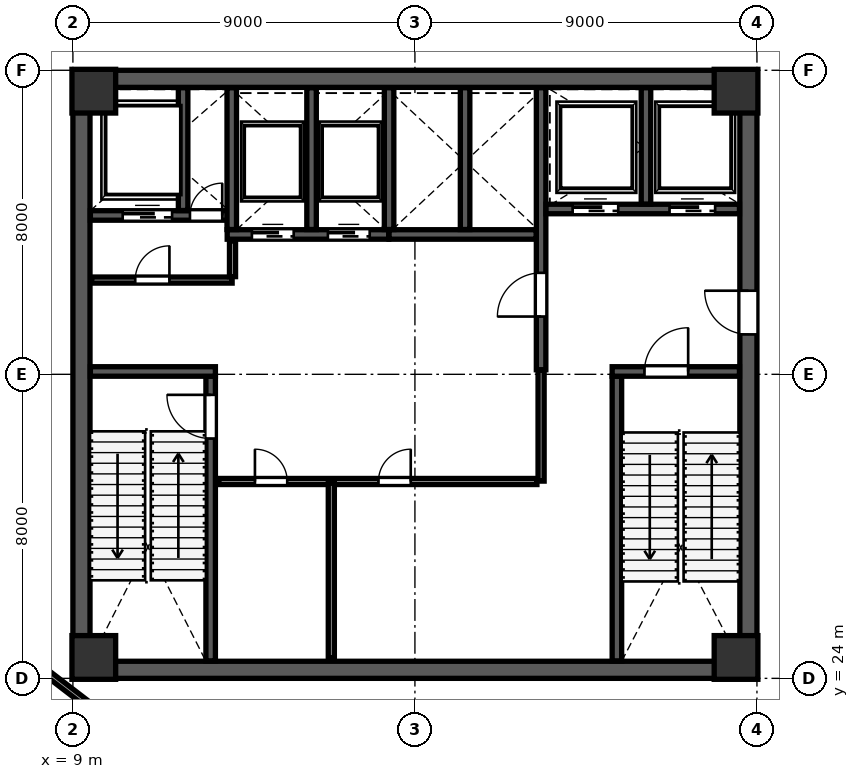
"""IFC4 building model, lengths in metres.
Left out: names, types, materials, properties, quantities, classifications, styles, units other than length and angle.
Written with IfcOpenShell. Run it as: python <this file> out.ifc"""

import sys

from ifc_helpers import new_model, si_unit, direction, frame, frame_2d, origin, origin_2d, place, context, subcontext, project, spatial, rectangle, extrude, source, transform, mapped, element, fill, save


model = new_model("IFC4")
c1 = context("Model", 3, precision=1e-05, world=origin(), true_north=direction((0.0, 1.0)))
c2 = subcontext(c1, "Body", "Model", "MODEL_VIEW")
j1 = project(units=[si_unit("LENGTHUNIT", "METRE"), si_unit("PLANEANGLEUNIT", "RADIAN")], contexts=[c1])
p1 = place(None, origin())
s1 = spatial("IfcSite", under=j1, at=p1, CompositionType="ELEMENT")
p2 = place(p1, origin())
s2 = spatial("IfcBuilding", under=s1, at=p2, CompositionType="ELEMENT")
p3 = place(p2, frame((0.0, 0.0, 204.4)))
s3 = spatial("IfcBuildingStorey", under=s2, at=p3, CompositionType="ELEMENT", Elevation=204.4)
m1 = source(origin(), c2, "Body", "SweptSolid", [
    extrude(rectangle(XDim=1.15, YDim=1.15, at=origin_2d()), origin(), (0.0, 0.0, 1.0), 5.399),
])
for number, where, z_axis, x_axis in (
    (1, (9.55, 24.55, 0.001), (0.0, 0.0, 1.0), (1.0, 0.0, 0.0)),
    (2, (26.45, 24.55, 0.001), (0.0, 0.0, 1.0), (1.0, 0.0, 0.0)),
    (3, (9.55, 39.45, 0.001), (0.0, 0.0, 1.0), (1.0, 0.0, 0.0)),
    (4, (26.45, 39.45, 0.001), (0.0, 0.0, 1.0), (1.0, 0.0, 0.0)),
):
    element("IfcColumn", number, at=place(p3, frame(where, z_axis=z_axis, x_axis=x_axis)), inside=s3, PredefinedType="COLUMN", context=c2, shape_type="MappedRepresentation", body=[
        mapped(m1, transform((0.0, 0.0, 0.0), scale=1.0)),
    ])
p4 = place(p3, frame((9.225, 24.45, 0.0), z_axis=(0.0, 0.0, 1.0), x_axis=(0.0, 1.0, 0.0)))
e5 = element("IfcWall", 5, at=p4, inside=s3, PredefinedType="SHEAR", context=c2, shape_type="SweptSolid", body=[
    extrude(rectangle(XDim=15.1, YDim=0.45, at=frame_2d((7.55, 0.0))), origin(), (0.0, 0.0, 1.0), 5.12),
])
p5 = place(p3, frame((26.775, 24.45, 0.0), z_axis=(0.0, 0.0, 1.0), x_axis=(0.0, 1.0, 0.0)))
e6 = element("IfcWall", 6, at=p5, inside=s3, PredefinedType="SHEAR", context=c2, shape_type="SweptSolid", body=[
    extrude(rectangle(XDim=15.1, YDim=0.45, at=frame_2d((7.55, 0.0))), origin(), (0.0, 0.0, 1.0), 5.12),
])
p6 = place(p5, frame((8.6, 0.0, 0.0)))
e7 = element("IfcOpeningElement", 7, at=p6, cuts=e6, PredefinedType="OPENING", context=c2, shape_type="SweptSolid", body=[
    extrude(rectangle(XDim=1.15, YDim=2.2, at=frame_2d((0.575, 1.1))), frame((0.0, 0.235, 0.0), z_axis=(0.0, -1.0, 0.0), x_axis=(1.0, 0.0, 0.0)), (0.0, 0.0, 1.0), 0.47),
])
for number, where, z_axis, x_axis in (
    (8, (9.0, 24.225, 0.0), (0.0, 0.0, 1.0), (1.0, 0.0, 0.0)),
    (9, (9.0, 39.775, 0.0), (0.0, 0.0, 1.0), (1.0, 0.0, 0.0)),
):
    element("IfcWall", number, at=place(p3, frame(where, z_axis=z_axis, x_axis=x_axis)), inside=s3, PredefinedType="SHEAR", context=c2, shape_type="SweptSolid", body=[
        extrude(rectangle(XDim=18.0, YDim=0.45, at=frame_2d((9.0, 0.0))), origin(), (0.0, 0.0, 1.0), 5.12),
    ])
p7 = place(p3, frame((12.625, 24.46, 0.0), z_axis=(0.0, 0.0, 1.0), x_axis=(0.0, 1.0, 0.0)))
e10 = element("IfcWall", 10, at=p7, inside=s3, PredefinedType="SHEAR", context=c2, shape_type="SweptSolid", body=[
    extrude(rectangle(XDim=7.49, YDim=0.25, at=frame_2d((3.745, 0.0))), origin(), (0.0, 0.0, 1.0), 5.12),
])
p8 = place(p7, frame((5.85, 0.0, 0.0)))
e11 = element("IfcOpeningElement", 11, at=p8, cuts=e10, PredefinedType="OPENING", context=c2, shape_type="SweptSolid", body=[
    extrude(rectangle(XDim=1.15, YDim=2.2, at=frame_2d((0.575, 1.1))), frame((0.0, 0.135, 0.0), z_axis=(0.0, -1.0, 0.0), x_axis=(1.0, 0.0, 0.0)), (0.0, 0.0, 1.0), 0.27),
])
p9 = place(p3, frame((9.46, 32.075, 0.0), z_axis=(0.0, 0.0, 1.0), x_axis=(1.0, 0.0, 0.0)))
e12 = element("IfcWall", 12, at=p9, inside=s3, PredefinedType="SHEAR", context=c2, shape_type="SweptSolid", body=[
    extrude(rectangle(XDim=3.29, YDim=0.25, at=frame_2d((1.645, 0.0))), origin(), (0.0, 0.0, 1.0), 5.12),
])
p10 = place(p3, frame((23.315, 24.46, 0.0), z_axis=(0.0, 0.0, 1.0), x_axis=(0.0, 1.0, 0.0)))
e13 = element("IfcWall", 13, at=p10, inside=s3, PredefinedType="SHEAR", context=c2, shape_type="SweptSolid", body=[
    extrude(rectangle(XDim=7.49, YDim=0.25, at=frame_2d((3.745, 0.0))), origin(), (0.0, 0.0, 1.0), 5.12),
])
p11 = place(p3, frame((23.19, 32.075, 0.0), z_axis=(0.0, 0.0, 1.0), x_axis=(1.0, 0.0, 0.0)))
e14 = element("IfcWall", 14, at=p11, inside=s3, PredefinedType="SHEAR", context=c2, shape_type="SweptSolid", body=[
    extrude(rectangle(XDim=3.35, YDim=0.25, at=frame_2d((1.675, 0.0))), origin(), (0.0, 0.0, 1.0), 5.12),
])
p12 = place(p11, frame((0.85, 0.0, 0.0)))
e15 = element("IfcOpeningElement", 15, at=p12, cuts=e14, PredefinedType="OPENING", context=c2, shape_type="SweptSolid", body=[
    extrude(rectangle(XDim=1.15, YDim=2.2, at=frame_2d((0.575, 1.1))), frame((0.0, 0.135, 0.0), z_axis=(0.0, -1.0, 0.0), x_axis=(1.0, 0.0, 0.0)), (0.0, 0.0, 1.0), 0.27),
])
p13 = place(p3, frame((21.32, 32.12, 0.0), z_axis=(0.0, 0.0, 1.0), x_axis=(0.0, 1.0, 0.0)))
e16 = element("IfcWall", 16, at=p13, inside=s3, PredefinedType="SHEAR", context=c2, shape_type="SweptSolid", body=[
    extrude(rectangle(XDim=7.42, YDim=0.25, at=frame_2d((3.71, 0.0))), origin(), (0.0, 0.0, 1.0), 5.12),
])
p14 = place(p13, frame((1.4, 0.0, 0.0)))
e17 = element("IfcOpeningElement", 17, at=p14, cuts=e16, PredefinedType="OPENING", context=c2, shape_type="SweptSolid", body=[
    extrude(rectangle(XDim=1.15, YDim=2.2, at=frame_2d((0.575, 1.1))), frame((0.0, 0.135, 0.0), z_axis=(0.0, -1.0, 0.0), x_axis=(1.0, 0.0, 0.0)), (0.0, 0.0, 1.0), 0.27),
])
p15 = place(p3, frame((9.46, 36.18, 0.0), z_axis=(0.0, 0.0, 1.0), x_axis=(1.0, 0.0, 0.0)))
e18 = element("IfcWall", 18, at=p15, inside=s3, PredefinedType="SHEAR", context=c2, shape_type="SweptSolid", body=[
    extrude(rectangle(XDim=3.79, YDim=0.25, at=frame_2d((1.895, 0.0))), origin(), (0.0, 0.0, 1.0), 5.12),
])
p16 = place(p15, frame((2.62, 0.0, 0.0)))
e19 = element("IfcOpeningElement", 19, at=p16, cuts=e18, PredefinedType="OPENING", context=c2, shape_type="SweptSolid", body=[
    extrude(rectangle(XDim=0.85, YDim=2.1, at=frame_2d((0.425, 1.05))), frame((0.0, 0.135, 0.0), z_axis=(0.0, -1.0, 0.0), x_axis=(1.0, 0.0, 0.0)), (0.0, 0.0, 1.0), 0.27),
])
p17 = place(p15, frame((0.85, 0.0, 0.0)))
e20 = element("IfcOpeningElement", 20, at=p17, cuts=e18, PredefinedType="OPENING", context=c2, shape_type="SweptSolid", body=[
    extrude(rectangle(XDim=1.3, YDim=2.25, at=frame_2d((0.65, 1.125))), frame((0.0, 0.135, 0.0), z_axis=(0.0, -1.0, 0.0), x_axis=(1.0, 0.0, 0.0)), (0.0, 0.0, 1.0), 0.27),
])
p18 = place(p3, frame((11.9, 36.31, 0.0), z_axis=(0.0, 0.0, 1.0), x_axis=(0.0, 1.0, 0.0)))
e21 = element("IfcWall", 21, at=p18, inside=s3, PredefinedType="SHEAR", context=c2, shape_type="SweptSolid", body=[
    extrude(rectangle(XDim=3.23, YDim=0.25, at=frame_2d((1.615, 0.0))), origin(), (0.0, 0.0, 1.0), 5.12),
])
p19 = place(p3, frame((21.45, 36.35, 0.0), z_axis=(0.0, 0.0, 1.0), x_axis=(1.0, 0.0, 0.0)))
e22 = element("IfcWall", 22, at=p19, inside=s3, PredefinedType="SHEAR", context=c2, shape_type="SweptSolid", body=[
    extrude(rectangle(XDim=5.09, YDim=0.25, at=frame_2d((2.545, 0.0))), origin(), (0.0, 0.0, 1.0), 5.12),
])
p20 = place(p19, frame((0.7, 0.0, 0.0)))
e23 = element("IfcOpeningElement", 23, at=p20, cuts=e22, PredefinedType="OPENING", context=c2, shape_type="SweptSolid", body=[
    extrude(rectangle(XDim=1.2, YDim=2.2, at=frame_2d((0.6, 1.1))), frame((0.0, 0.135, 0.0), z_axis=(0.0, -1.0, 0.0), x_axis=(1.0, 0.0, 0.0)), (0.0, 0.0, 1.0), 0.27),
])
p21 = place(p19, frame((3.25, 0.0, 0.0)))
e24 = element("IfcOpeningElement", 24, at=p21, cuts=e22, PredefinedType="OPENING", context=c2, shape_type="SweptSolid", body=[
    extrude(rectangle(XDim=1.2, YDim=2.2, at=frame_2d((0.6, 1.1))), frame((0.0, 0.135, 0.0), z_axis=(0.0, -1.0, 0.0), x_axis=(1.0, 0.0, 0.0)), (0.0, 0.0, 1.0), 0.27),
])
p22 = place(p3, frame((24.08, 36.48, 0.0), z_axis=(0.0, 0.0, 1.0), x_axis=(0.0, 1.0, 0.0)))
e25 = element("IfcWall", 25, at=p22, inside=s3, PredefinedType="SHEAR", context=c2, shape_type="SweptSolid", body=[
    extrude(rectangle(XDim=3.06, YDim=0.25, at=frame_2d((1.53, 0.0))), origin(), (0.0, 0.0, 1.0), 5.12),
])
p23 = place(p3, frame((13.06, 35.68, 0.0), z_axis=(0.0, 0.0, 1.0), x_axis=(1.0, 0.0, 0.0)))
e26 = element("IfcWall", 26, at=p23, inside=s3, PredefinedType="SHEAR", context=c2, shape_type="SweptSolid", body=[
    extrude(rectangle(XDim=4.25, YDim=0.25, at=frame_2d((2.125, 0.0))), origin(), (0.0, 0.0, 1.0), 5.12),
])
p24 = place(p23, frame((0.65, 0.0, 0.0)))
e27 = element("IfcOpeningElement", 27, at=p24, cuts=e26, PredefinedType="OPENING", context=c2, shape_type="SweptSolid", body=[
    extrude(rectangle(XDim=1.1, YDim=2.2, at=frame_2d((0.55, 1.1))), frame((0.0, 0.135, 0.0), z_axis=(0.0, -1.0, 0.0), x_axis=(1.0, 0.0, 0.0)), (0.0, 0.0, 1.0), 0.27),
])
p25 = place(p23, frame((2.65, 0.0, 0.0)))
e28 = element("IfcOpeningElement", 28, at=p25, cuts=e26, PredefinedType="OPENING", context=c2, shape_type="SweptSolid", body=[
    extrude(rectangle(XDim=1.1, YDim=2.2, at=frame_2d((0.55, 1.1))), frame((0.0, 0.135, 0.0), z_axis=(0.0, -1.0, 0.0), x_axis=(1.0, 0.0, 0.0)), (0.0, 0.0, 1.0), 0.27),
])
for number, where, z_axis, x_axis in (
    (29, (13.18, 35.81, 0.0), (0.0, 0.0, 1.0), (0.0, 1.0, 0.0)),
    (30, (15.28, 35.81, 0.0), (0.0, 0.0, 1.0), (0.0, 1.0, 0.0)),
):
    element("IfcWall", number, at=place(p3, frame(where, z_axis=z_axis, x_axis=x_axis)), inside=s3, PredefinedType="SHEAR", context=c2, shape_type="SweptSolid", body=[
        extrude(rectangle(XDim=3.73, YDim=0.25, at=frame_2d((1.865, 0.0))), origin(), (0.0, 0.0, 1.0), 5.12),
    ])
p26 = place(p3, frame((17.32, 35.68, 0.0), z_axis=(0.0, 0.0, 1.0), x_axis=(1.0, 0.0, 0.0)))
e31 = element("IfcWall", 31, at=p26, inside=s3, PredefinedType="SHEAR", context=c2, shape_type="SweptSolid", body=[
    extrude(rectangle(XDim=3.87, YDim=0.25, at=frame_2d((1.935, 0.0))), origin(), (0.0, 0.0, 1.0), 5.12),
])
for number, where, z_axis, x_axis in (
    (32, (17.32, 35.81, 0.0), (0.0, 0.0, 1.0), (0.0, 1.0, 0.0)),
    (33, (19.32, 35.81, 0.0), (0.0, 0.0, 1.0), (0.0, 1.0, 0.0)),
):
    element("IfcWall", number, at=place(p3, frame(where, z_axis=z_axis, x_axis=x_axis)), inside=s3, PredefinedType="SHEAR", context=c2, shape_type="SweptSolid", body=[
        extrude(rectangle(XDim=3.73, YDim=0.25, at=frame_2d((1.865, 0.0))), origin(), (0.0, 0.0, 1.0), 5.12),
    ])
p27 = place(p3, frame((9.49, 34.48, 0.0), z_axis=(0.0, 0.0, 1.0), x_axis=(1.0, 0.0, 0.0)))
e34 = element("IfcWall", 34, at=p27, inside=s3, PredefinedType="PARTITIONING", context=c2, shape_type="SweptSolid", body=[
    extrude(rectangle(XDim=3.7, YDim=0.16, at=frame_2d((1.85, 0.0))), origin(), (0.0, 0.0, 1.0), 5.12),
])
p28 = place(p27, frame((1.15, 0.0, 0.0)))
e35 = element("IfcOpeningElement", 35, at=p28, cuts=e34, PredefinedType="OPENING", context=c2, shape_type="SweptSolid", body=[
    extrude(rectangle(XDim=0.9, YDim=2.15, at=frame_2d((0.45, 1.075))), frame((0.0, 0.09, 0.0), z_axis=(0.0, -1.0, 0.0), x_axis=(1.0, 0.0, 0.0)), (0.0, 0.0, 1.0), 0.18),
])
p29 = place(p3, frame((13.2, 34.57, 0.0), z_axis=(0.0, 0.0, 1.0), x_axis=(0.0, 1.0, 0.0)))
e36 = element("IfcWall", 36, at=p29, inside=s3, PredefinedType="PARTITIONING", context=c2, shape_type="SweptSolid", body=[
    extrude(rectangle(XDim=0.94, YDim=0.16, at=frame_2d((0.47, 0.0))), origin(), (0.0, 0.0, 1.0), 5.12),
])
p30 = place(p3, frame((12.84, 29.18, 0.0), z_axis=(0.0, 0.0, 1.0), x_axis=(1.0, 0.0, 0.0)))
e37 = element("IfcWall", 37, at=p30, inside=s3, PredefinedType="PARTITIONING", context=c2, shape_type="SweptSolid", body=[
    extrude(rectangle(XDim=8.37, YDim=0.16, at=frame_2d((4.185, 0.0))), origin(), (0.0, 0.0, 1.0), 5.12),
])
p31 = place(p30, frame((0.95, 0.0, 0.0)))
e38 = element("IfcOpeningElement", 38, at=p31, cuts=e37, PredefinedType="OPENING", context=c2, shape_type="SweptSolid", body=[
    extrude(rectangle(XDim=0.85, YDim=2.1, at=frame_2d((0.425, 1.05))), frame((0.0, 0.09, 0.0), z_axis=(0.0, -1.0, 0.0), x_axis=(1.0, 0.0, 0.0)), (0.0, 0.0, 1.0), 0.18),
])
p32 = place(p30, frame((4.2, 0.0, 0.0)))
e39 = element("IfcOpeningElement", 39, at=p32, cuts=e37, PredefinedType="OPENING", context=c2, shape_type="SweptSolid", body=[
    extrude(rectangle(XDim=0.85, YDim=2.1, at=frame_2d((0.425, 1.05))), frame((0.0, 0.09, 0.0), z_axis=(0.0, -1.0, 0.0), x_axis=(1.0, 0.0, 0.0)), (0.0, 0.0, 1.0), 0.18),
])
p33 = place(p3, frame((15.8, 24.54, 0.0), z_axis=(0.0, 0.0, 1.0), x_axis=(0.0, 1.0, 0.0)))
e40 = element("IfcWall", 40, at=p33, inside=s3, PredefinedType="PARTITIONING", context=c2, shape_type="SweptSolid", body=[
    extrude(rectangle(XDim=4.6, YDim=0.16, at=frame_2d((2.3, 0.0))), origin(), (0.0, 0.0, 1.0), 5.12),
])
p34 = place(p3, frame((21.32, 29.19, 0.0), z_axis=(0.0, 0.0, 1.0), x_axis=(0.0, 1.0, 0.0)))
e41 = element("IfcWall", 41, at=p34, inside=s3, PredefinedType="PARTITIONING", context=c2, shape_type="SweptSolid", body=[
    extrude(rectangle(XDim=2.92, YDim=0.16, at=frame_2d((1.46, 0.0))), origin(), (0.0, 0.0, 1.0), 5.12),
])
p35 = place(p3, frame((5.433, 26.354, 0.0), z_axis=(0.0, 0.0, 1.0), x_axis=(0.793362099466, -0.60875001366, 0.0)))
e42 = element("IfcWall", 42, at=p35, inside=s3, PredefinedType="PARTITIONING", context=c2, shape_type="SweptSolid", body=[
    extrude(rectangle(XDim=20.42, YDim=0.16, at=frame_2d((10.21, 0.0))), origin(), (0.0, 0.0, 1.0), 5.12),
])
p36 = place(p35, frame((1.45, 0.0, 0.0)))
e43 = element("IfcOpeningElement", 43, at=p36, cuts=e42, PredefinedType="OPENING", context=c2, shape_type="SweptSolid", body=[
    extrude(rectangle(XDim=0.95, YDim=2.15, at=frame_2d((0.475, 1.075))), frame((0.0, 0.09, 0.0), z_axis=(0.0, -1.0, 0.0), x_axis=(1.0, 0.0, 0.0)), (0.0, 0.0, 1.0), 0.18),
])
p37 = place(p3, frame((14.418, 51.551, 0.0), z_axis=(0.0, 0.0, 1.0), x_axis=(0.793357597302, -0.608755881124, 0.0)))
e44 = element("IfcWall", 44, at=p37, inside=s3, PredefinedType="PARTITIONING", context=c2, shape_type="SweptSolid", body=[
    extrude(rectangle(XDim=28.63, YDim=0.1, at=frame_2d((14.315, 0.0))), origin(), (0.0, 0.0, 1.0), 5.12),
])
p38 = place(p37, frame((20.31, 0.0, 0.0)))
e45 = element("IfcOpeningElement", 45, at=p38, cuts=e44, PredefinedType="OPENING", context=c2, shape_type="SweptSolid", body=[
    extrude(rectangle(XDim=0.95, YDim=2.15, at=frame_2d((0.475, 1.075))), frame((0.0, 0.06, 0.0), z_axis=(0.0, -1.0, 0.0), x_axis=(1.0, 0.0, 0.0)), (0.0, 0.0, 1.0), 0.12),
])
p39 = place(p3, frame((19.564, 11.16, 0.0), z_axis=(0.0, 0.0, 1.0), x_axis=(0.608754410964, 0.793358725377, 0.0)))
e46 = element("IfcWall", 46, at=p39, inside=s3, PredefinedType="PARTITIONING", context=c2, shape_type="SweptSolid", body=[
    extrude(rectangle(XDim=19.872, YDim=0.16, at=frame_2d((9.936, 0.0))), origin(), (0.0, 0.0, 1.0), 5.12),
])
m2 = source(origin(), c2, "Body", "SweptSolid", [
    extrude(rectangle(XDim=1.15, YDim=2.2, at=frame_2d((0.575, 1.1))), frame((0.0, 0.025, 0.0), z_axis=(0.0, -1.0, 0.0), x_axis=(1.0, 0.0, 0.0)), (0.0, 0.0, 1.0), 0.05),
])
p40 = place(p8, origin())
e47 = element("IfcDoor", 47, at=p40, inside=s3, OperationType="SINGLE_SWING_RIGHT", PredefinedType="DOOR", context=c2, shape_type="MappedRepresentation", body=[
    mapped(m2, transform((0.0, 0.0, 0.0), scale=1.0)),
])
fill(e11, e47)
m3 = source(origin(), c2, "Body", "SweptSolid", [
    extrude(rectangle(XDim=1.15, YDim=2.2, at=frame_2d((0.575, 1.1))), frame((0.0, 0.025, 0.0), z_axis=(0.0, -1.0, 0.0), x_axis=(1.0, 0.0, 0.0)), (0.0, 0.0, 1.0), 0.05),
])
p41 = place(p14, origin())
e48 = element("IfcDoor", 48, at=p41, inside=s3, OperationType="SINGLE_SWING_LEFT", PredefinedType="DOOR", context=c2, shape_type="MappedRepresentation", body=[
    mapped(m3, transform((0.0, 0.0, 0.0), scale=1.0)),
])
fill(e17, e48)
p42 = place(p12, origin())
e49 = element("IfcDoor", 49, at=p42, inside=s3, OperationType="SINGLE_SWING_RIGHT", PredefinedType="DOOR", context=c2, shape_type="MappedRepresentation", body=[
    mapped(m2, transform((0.0, 0.0, 0.0), scale=1.0)),
])
fill(e15, e49)
p43 = place(p6, origin())
e50 = element("IfcDoor", 50, at=p43, inside=s3, OperationType="SINGLE_SWING_RIGHT", PredefinedType="DOOR", context=c2, shape_type="MappedRepresentation", body=[
    mapped(m3, transform((0.0, 0.0, 0.0), scale=1.0)),
])
fill(e7, e50)
m4 = source(origin(), c2, "Body", "SweptSolid", [
    extrude(rectangle(XDim=0.85, YDim=2.1, at=frame_2d((0.425, 1.05))), frame((0.0, 0.025, 0.0), z_axis=(0.0, -1.0, 0.0), x_axis=(1.0, 0.0, 0.0)), (0.0, 0.0, 1.0), 0.05),
])
p44 = place(p16, origin())
e51 = element("IfcDoor", 51, at=p44, inside=s3, OperationType="SINGLE_SWING_RIGHT", PredefinedType="DOOR", context=c2, shape_type="MappedRepresentation", body=[
    mapped(m4, transform((0.0, 0.0, 0.0), scale=1.0)),
])
fill(e19, e51)
m5 = source(origin(), c2, "Body", "SweptSolid", [
    extrude(rectangle(XDim=1.1, YDim=2.2, at=frame_2d((0.55, 1.1))), frame((0.0, 0.025, 0.0), z_axis=(0.0, -1.0, 0.0), x_axis=(1.0, 0.0, 0.0)), (0.0, 0.0, 1.0), 0.05),
])
p45 = place(p24, origin())
e52 = element("IfcDoor", 52, at=p45, inside=s3, OperationType="SLIDING_TO_LEFT", PredefinedType="DOOR", context=c2, shape_type="MappedRepresentation", body=[
    mapped(m5, transform((0.0, 0.0, 0.0), scale=1.0)),
])
fill(e27, e52)
p46 = place(p25, origin())
e53 = element("IfcDoor", 53, at=p46, inside=s3, OperationType="SLIDING_TO_RIGHT", PredefinedType="DOOR", context=c2, shape_type="MappedRepresentation", body=[
    mapped(m5, transform((0.0, 0.0, 0.0), scale=1.0)),
])
fill(e28, e53)
m6 = source(origin(), c2, "Body", "SweptSolid", [
    extrude(rectangle(XDim=1.2, YDim=2.2, at=frame_2d((0.6, 1.1))), frame((0.0, 0.025, 0.0), z_axis=(0.0, -1.0, 0.0), x_axis=(1.0, 0.0, 0.0)), (0.0, 0.0, 1.0), 0.05),
])
p47 = place(p20, origin())
e54 = element("IfcDoor", 54, at=p47, inside=s3, OperationType="SLIDING_TO_LEFT", PredefinedType="DOOR", context=c2, shape_type="MappedRepresentation", body=[
    mapped(m6, transform((0.0, 0.0, 0.0), scale=1.0)),
])
fill(e23, e54)
p48 = place(p21, origin())
e55 = element("IfcDoor", 55, at=p48, inside=s3, OperationType="SLIDING_TO_RIGHT", PredefinedType="DOOR", context=c2, shape_type="MappedRepresentation", body=[
    mapped(m6, transform((0.0, 0.0, 0.0), scale=1.0)),
])
fill(e24, e55)
m7 = source(origin(), c2, "Body", "SweptSolid", [
    extrude(rectangle(XDim=1.3, YDim=2.25, at=frame_2d((0.65, 1.125))), frame((0.0, 0.025, 0.0), z_axis=(0.0, -1.0, 0.0), x_axis=(1.0, 0.0, 0.0)), (0.0, 0.0, 1.0), 0.05),
])
p49 = place(p17, origin())
e56 = element("IfcDoor", 56, at=p49, inside=s3, OperationType="SLIDING_TO_LEFT", PredefinedType="DOOR", context=c2, shape_type="MappedRepresentation", body=[
    mapped(m7, transform((0.0, 0.0, 0.0), scale=1.0)),
])
fill(e20, e56)
m8 = source(origin(), c2, "Body", "SweptSolid", [
    extrude(rectangle(XDim=0.9, YDim=2.15, at=frame_2d((0.45, 1.075))), frame((0.0, 0.025, 0.0), z_axis=(0.0, -1.0, 0.0), x_axis=(1.0, 0.0, 0.0)), (0.0, 0.0, 1.0), 0.05),
])
p50 = place(p28, origin())
e57 = element("IfcDoor", 57, at=p50, inside=s3, OperationType="SINGLE_SWING_RIGHT", PredefinedType="DOOR", context=c2, shape_type="MappedRepresentation", body=[
    mapped(m8, transform((0.0, 0.0, 0.0), scale=1.0)),
])
fill(e35, e57)
p51 = place(p31, origin())
e58 = element("IfcDoor", 58, at=p51, inside=s3, OperationType="SINGLE_SWING_LEFT", PredefinedType="DOOR", context=c2, shape_type="MappedRepresentation", body=[
    mapped(m4, transform((0.0, 0.0, 0.0), scale=1.0)),
])
fill(e38, e58)
p52 = place(p32, origin())
e59 = element("IfcDoor", 59, at=p52, inside=s3, OperationType="SINGLE_SWING_RIGHT", PredefinedType="DOOR", context=c2, shape_type="MappedRepresentation", body=[
    mapped(m4, transform((0.0, 0.0, 0.0), scale=1.0)),
])
fill(e39, e59)
save(model, sys.argv[1])
